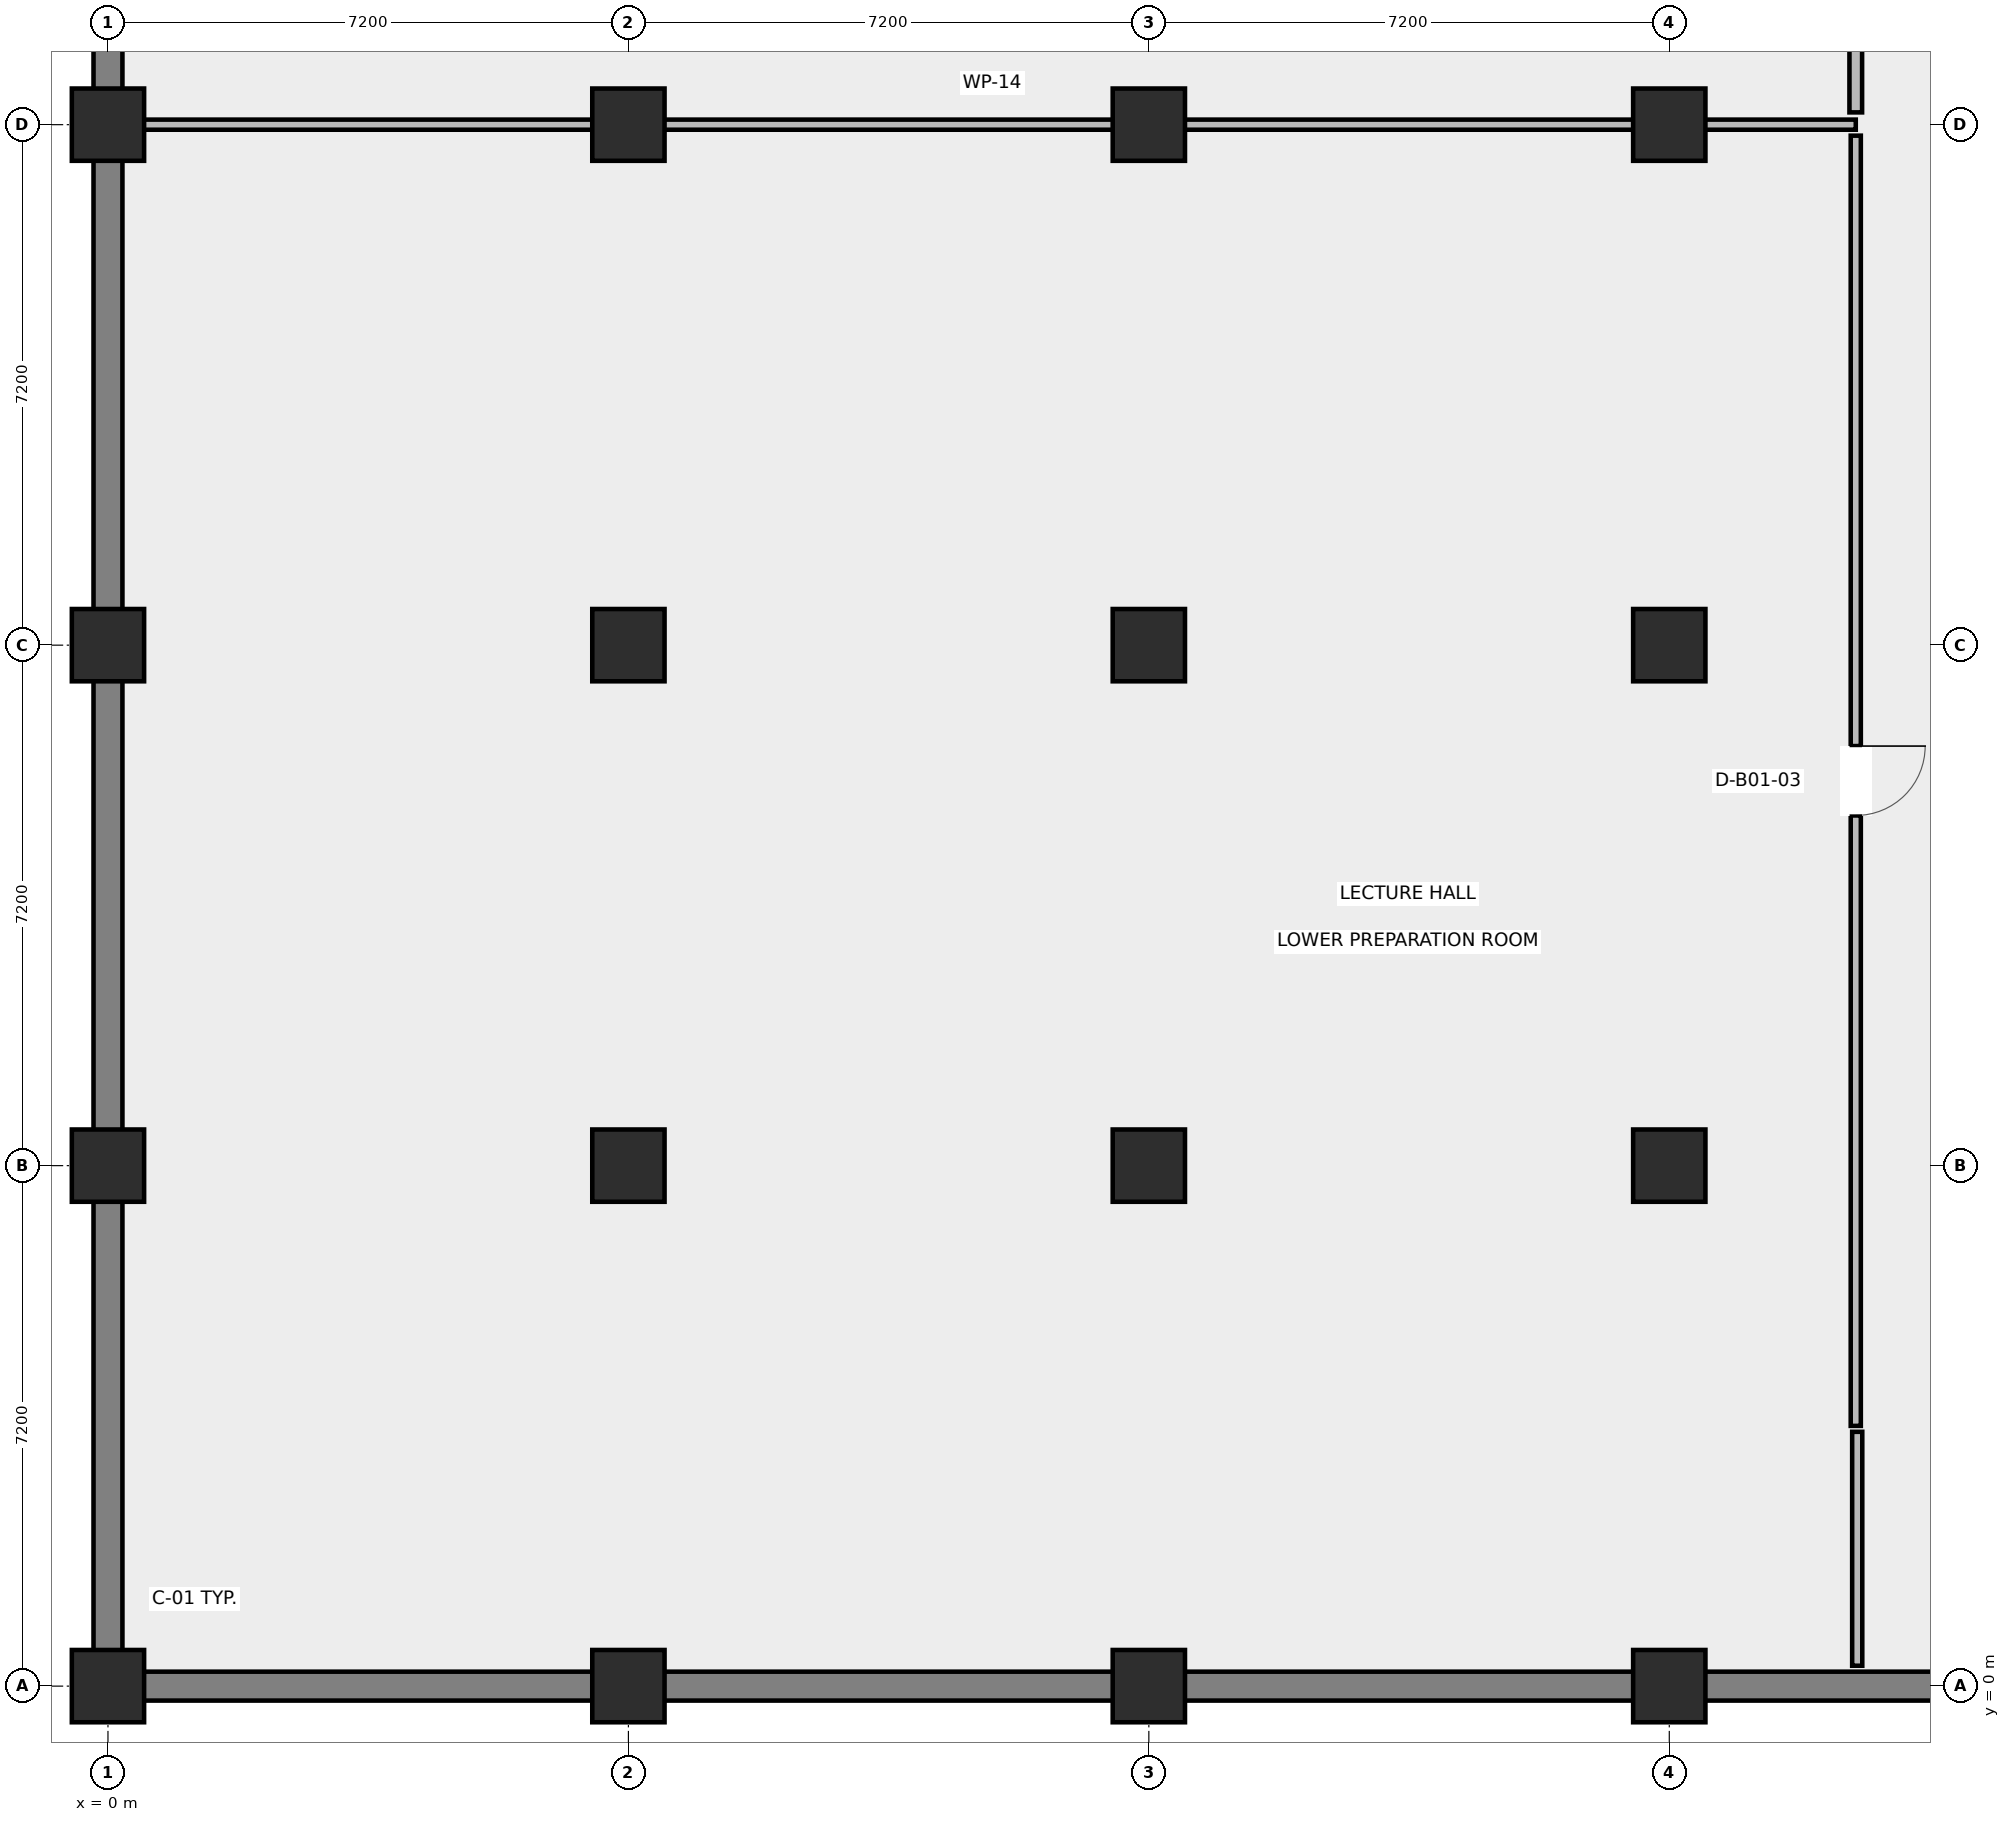
"""IFC4 building model, lengths in metres.
Left out: names, types, materials, properties, quantities, classifications, styles, units other than length and angle.
Written with IfcOpenShell. Run it as: python <this file> out.ifc"""

import sys

from ifc_helpers import new_model, si_unit, direction, frame, frame_2d, origin, origin_2d, place, context, subcontext, project, spatial, rectangle, extrude, element, fill, save


model = new_model("IFC4")
c1 = context("Model", 3, precision=1e-05, world=origin(), true_north=direction((0.0, 1.0)))
c2 = subcontext(c1, "Body", "Model", "MODEL_VIEW")
j1 = project(units=[si_unit("LENGTHUNIT", "METRE"), si_unit("PLANEANGLEUNIT", "RADIAN")], contexts=[c1])
p1 = place(None, origin())
s1 = spatial("IfcSite", under=j1, at=p1, CompositionType="ELEMENT")
p2 = place(p1, origin())
s2 = spatial("IfcBuilding", under=s1, at=p2, CompositionType="ELEMENT")
p3 = place(p2, frame((0.0, 0.0, -4.5)))
s3 = spatial("IfcBuildingStorey", under=s2, at=p3, CompositionType="ELEMENT", Elevation=-4.5)
for number, where, z_axis, x_axis in (
    (1, (0.0, 0.0, 0.0), (0.0, 0.0, 1.0), (1.0, 0.0, 0.0)),
    (2, (0.0, 7.2, 0.0), (0.0, 0.0, 1.0), (1.0, 0.0, 0.0)),
    (3, (0.0, 14.4, 0.0), (0.0, 0.0, 1.0), (1.0, 0.0, 0.0)),
    (4, (0.0, 21.6, 0.0), (0.0, 0.0, 1.0), (1.0, 0.0, 0.0)),
    (5, (7.2, 0.0, 0.0), (0.0, 0.0, 1.0), (1.0, 0.0, 0.0)),
    (6, (7.2, 7.2, 0.0), (0.0, 0.0, 1.0), (1.0, 0.0, 0.0)),
    (7, (7.2, 14.4, 0.0), (0.0, 0.0, 1.0), (1.0, 0.0, 0.0)),
    (8, (7.2, 21.6, 0.0), (0.0, 0.0, 1.0), (1.0, 0.0, 0.0)),
    (9, (14.4, 0.0, 0.0), (0.0, 0.0, 1.0), (1.0, 0.0, 0.0)),
    (10, (14.4, 7.2, 0.0), (0.0, 0.0, 1.0), (1.0, 0.0, 0.0)),
    (11, (14.4, 14.4, 0.0), (0.0, 0.0, 1.0), (1.0, 0.0, 0.0)),
    (12, (14.4, 21.6, 0.0), (0.0, 0.0, 1.0), (1.0, 0.0, 0.0)),
    (13, (21.6, 0.0, 0.0), (0.0, 0.0, 1.0), (1.0, 0.0, 0.0)),
    (14, (21.6, 7.2, 0.0), (0.0, 0.0, 1.0), (1.0, 0.0, 0.0)),
    (15, (21.6, 14.4, 0.0), (0.0, 0.0, 1.0), (1.0, 0.0, 0.0)),
    (16, (21.6, 21.6, 0.0), (0.0, 0.0, 1.0), (1.0, 0.0, 0.0)),
):
    element("IfcColumn", number, at=place(p3, frame(where, z_axis=z_axis, x_axis=x_axis)), inside=s3, PredefinedType="COLUMN", context=c2, shape_type="SweptSolid", body=[
        extrude(rectangle(XDim=1.0, YDim=1.0, at=origin_2d()), origin(), (0.0, 0.0, 1.0), 4.15),
    ])
p4 = place(p3, frame((36.0, 0.0, 0.0), z_axis=(0.0, 0.0, 1.0), x_axis=(-1.0, 0.0, 0.0)))
e17 = element("IfcWall", 17, at=p4, inside=s3, PredefinedType="SOLIDWALL", context=c2, shape_type="SweptSolid", body=[
    extrude(rectangle(XDim=36.0, YDim=0.4, at=frame_2d((18.0, 0.0))), origin(), (0.0, 0.0, 1.0), 4.15),
])
p5 = place(p3, frame((0.0, 0.0, 0.0), z_axis=(0.0, 0.0, 1.0), x_axis=(0.0, 1.0, 0.0)))
e18 = element("IfcWall", 18, at=p5, inside=s3, PredefinedType="SOLIDWALL", context=c2, shape_type="SweptSolid", body=[
    extrude(rectangle(XDim=43.2, YDim=0.4, at=frame_2d((21.6, 0.0))), origin(), (0.0, 0.0, 1.0), 4.15),
])
p6 = place(p3, frame((0.282, 21.6, 0.0), z_axis=(0.0, 0.0, 1.0), x_axis=(1.0, 0.0, 0.0)))
e19 = element("IfcWall", 19, at=p6, inside=s3, PredefinedType="PARTITIONING", context=c2, shape_type="SweptSolid", body=[
    extrude(rectangle(XDim=23.898, YDim=0.14, at=frame_2d((11.949, 0.0))), origin(), (0.0, 0.0, 1.0), 3.19),
])
p7 = place(p3, frame((24.18, 21.448, 0.0), z_axis=(0.0, 0.0, 1.0), x_axis=(0.0, -1.0, 0.0)))
e20 = element("IfcWall", 20, at=p7, inside=s3, PredefinedType="PARTITIONING", context=c2, shape_type="SweptSolid", body=[
    extrude(rectangle(XDim=17.848, YDim=0.14, at=frame_2d((8.924, 0.0))), origin(), (0.0, 0.0, 1.0), 3.19),
])
p8 = place(p7, frame((8.444, 0.0, 0.0)))
e21 = element("IfcOpeningElement", 21, at=p8, cuts=e20, PredefinedType="OPENING", context=c2, shape_type="SweptSolid", body=[
    extrude(rectangle(XDim=0.96, YDim=2.1, at=frame_2d((0.48, 1.05))), frame((0.0, 0.08, 0.0), z_axis=(0.0, -1.0, 0.0), x_axis=(1.0, 0.0, 0.0)), (0.0, 0.0, 1.0), 0.16),
])
p9 = place(p3, frame((24.2, 3.518, 0.0), z_axis=(0.0, 0.0, 1.0), x_axis=(0.0, -1.0, 0.0)))
e22 = element("IfcWall", 22, at=p9, inside=s3, PredefinedType="PARTITIONING", context=c2, shape_type="SweptSolid", body=[
    extrude(rectangle(XDim=3.236, YDim=0.14, at=frame_2d((1.618, 0.0))), origin(), (0.0, 0.0, 1.0), 3.19),
])
p10 = place(p3, frame((24.18, 39.0, 0.0), z_axis=(0.0, 0.0, 1.0), x_axis=(0.0, -1.0, 0.0)))
e23 = element("IfcWall", 23, at=p10, inside=s3, PredefinedType="PARTITIONING", context=c2, shape_type="SweptSolid", body=[
    extrude(rectangle(XDim=17.23, YDim=0.175, at=frame_2d((8.615, 0.0))), origin(), (0.0, 0.0, 1.0), 3.19),
])
p11 = place(p10, frame((7.925, 0.0, 0.0)))
e24 = element("IfcOpeningElement", 24, at=p11, cuts=e23, PredefinedType="OPENING", context=c2, shape_type="SweptSolid", body=[
    extrude(rectangle(XDim=1.38, YDim=2.15, at=frame_2d((0.69, 1.075))), frame((0.0, 0.097, 0.0), z_axis=(0.0, -1.0, 0.0), x_axis=(1.0, 0.0, 0.0)), (0.0, 0.0, 1.0), 0.195),
])
p12 = place(p8, origin())
e25 = element("IfcDoor", 25, at=p12, inside=s3, OperationType="SINGLE_SWING_LEFT", PredefinedType="DOOR", context=c2, shape_type="SweptSolid", body=[
    extrude(rectangle(XDim=0.96, YDim=2.1, at=frame_2d((0.48, 1.05))), frame((0.0, 0.025, 0.0), z_axis=(0.0, -1.0, 0.0), x_axis=(1.0, 0.0, 0.0)), (0.0, 0.0, 1.0), 0.05),
])
fill(e21, e25)
save(model, sys.argv[1])
